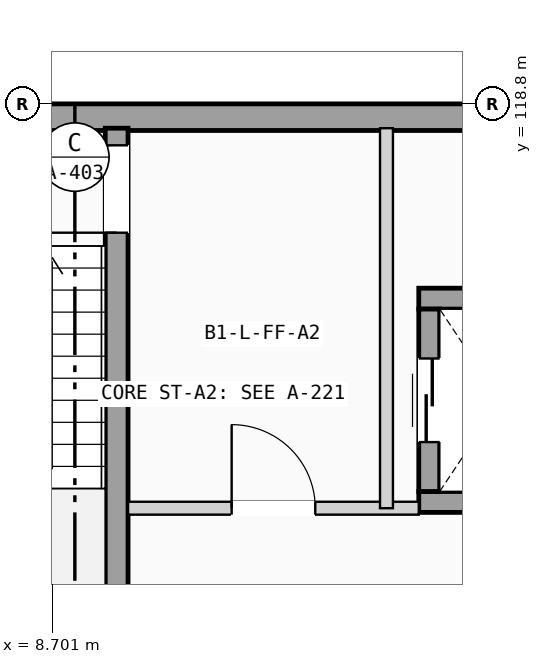
"""IFC4 building model, lengths in metres.
Left out: names, types, materials, properties, quantities, classifications, styles, units other than length and angle.
Written with IfcOpenShell. Run it as: python <this file> out.ifc"""

import sys

from ifc_helpers import new_model, si_unit, direction, frame, frame_2d, origin, place, context, subcontext, project, spatial, rectangle, extrude, element, fill, save


model = new_model("IFC4")
c1 = context("Model", 3, precision=1e-05, world=origin(), true_north=direction((0.0, 1.0)))
c2 = subcontext(c1, "Body", "Model", "MODEL_VIEW")
j1 = project(units=[si_unit("LENGTHUNIT", "METRE"), si_unit("PLANEANGLEUNIT", "RADIAN")], contexts=[c1])
p1 = place(None, origin())
s1 = spatial("IfcSite", under=j1, at=p1, CompositionType="ELEMENT")
p2 = place(p1, origin())
s2 = spatial("IfcBuilding", under=s1, at=p2, CompositionType="ELEMENT")
p3 = place(p2, frame((0.0, 0.0, -4.2)))
s3 = spatial("IfcBuildingStorey", under=s2, at=p3, CompositionType="ELEMENT", Elevation=-4.2)
p4 = place(p3, frame((0.0, 118.625, 0.0), z_axis=(0.0, 0.0, 1.0), x_axis=(1.0, 0.0, 0.0)))
e1 = element("IfcWall", 1, at=p4, inside=s3, PredefinedType="SOLIDWALL", context=c2, shape_type="SweptSolid", body=[
    extrude(rectangle(XDim=172.8, YDim=0.35, at=frame_2d((86.4, 0.0))), origin(), (0.0, 0.0, 1.0), 3.92),
])
p5 = place(p3, frame((9.55, 111.48, 0.0), z_axis=(0.0, 0.0, 1.0), x_axis=(0.0, 1.0, 0.0)))
e2 = element("IfcWall", 2, at=p5, inside=s3, PredefinedType="SHEAR", context=c2, shape_type="SweptSolid", body=[
    extrude(rectangle(XDim=7.0, YDim=0.3, at=frame_2d((3.5, 0.0))), origin(), (0.0, 0.0, 1.0), 3.92),
])
p6 = place(p5, frame((5.625, 0.0, 0.0)))
e3 = element("IfcOpeningElement", 3, at=p6, cuts=e2, PredefinedType="OPENING", context=c2, shape_type="SweptSolid", body=[
    extrude(rectangle(XDim=1.15, YDim=2.12, at=frame_2d((0.575, 1.06))), frame((0.0, 0.16, 0.0), z_axis=(0.0, -1.0, 0.0), x_axis=(1.0, 0.0, 0.0)), (0.0, 0.0, 1.0), 0.32),
])
for number, where, z_axis, x_axis in (
    (4, (13.525, 113.562, 0.0), (0.0, 0.0, 1.0), (1.0, 0.0, 0.0)),
    (5, (13.525, 116.238, 0.0), (0.0, 0.0, 1.0), (1.0, 0.0, 0.0)),
):
    element("IfcWall", number, at=place(p3, frame(where, z_axis=z_axis, x_axis=x_axis)), inside=s3, PredefinedType="SHEAR", context=c2, shape_type="SweptSolid", body=[
        extrude(rectangle(XDim=2.15, YDim=0.275, at=frame_2d((1.075, 0.0))), origin(), (0.0, 0.0, 1.0), 3.92),
    ])
p7 = place(p3, frame((13.663, 113.7, 0.0), z_axis=(0.0, 0.0, 1.0), x_axis=(0.0, 1.0, 0.0)))
e6 = element("IfcWall", 6, at=p7, inside=s3, PredefinedType="SHEAR", context=c2, shape_type="SweptSolid", body=[
    extrude(rectangle(XDim=2.4, YDim=0.275, at=frame_2d((1.2, 0.0))), origin(), (0.0, 0.0, 1.0), 3.92),
])
p8 = place(p7, frame((0.65, 0.0, 0.0)))
e7 = element("IfcOpeningElement", 7, at=p8, cuts=e6, PredefinedType="OPENING", context=c2, shape_type="SweptSolid", body=[
    extrude(rectangle(XDim=1.1, YDim=2.15, at=frame_2d((0.55, 1.075))), frame((0.0, 0.147, 0.0), z_axis=(0.0, -1.0, 0.0), x_axis=(1.0, 0.0, 0.0)), (0.0, 0.0, 1.0), 0.295),
])
p9 = place(p3, frame((9.7, 113.48, 0.0), z_axis=(0.0, 0.0, 1.0), x_axis=(1.0, 0.0, 0.0)))
e8 = element("IfcWall", 8, at=p9, inside=s3, PredefinedType="PARTITIONING", context=c2, shape_type="SweptSolid", body=[
    extrude(rectangle(XDim=3.825, YDim=0.17, at=frame_2d((1.913, 0.0))), origin(), (0.0, 0.0, 1.0), 3.84),
])
p10 = place(p9, frame((1.363, 0.0, 0.0)))
e9 = element("IfcOpeningElement", 9, at=p10, cuts=e8, PredefinedType="OPENING", context=c2, shape_type="SweptSolid", body=[
    extrude(rectangle(XDim=1.1, YDim=2.12, at=frame_2d((0.55, 1.06))), frame((0.0, 0.095, 0.0), z_axis=(0.0, -1.0, 0.0), x_axis=(1.0, 0.0, 0.0)), (0.0, 0.0, 1.0), 0.19),
])
p11 = place(p3, frame((13.1, 113.48, 0.0), z_axis=(0.0, 0.0, 1.0), x_axis=(0.0, 1.0, 0.0)))
e10 = element("IfcWall", 10, at=p11, inside=s3, PredefinedType="PARTITIONING", context=c2, shape_type="SweptSolid", body=[
    extrude(rectangle(XDim=5.0, YDim=0.17, at=frame_2d((2.5, 0.0))), origin(), (0.0, 0.0, 1.0), 3.84),
])
p12 = place(p6, origin())
e11 = element("IfcDoor", 11, at=p12, inside=s3, OperationType="SINGLE_SWING_LEFT", PredefinedType="DOOR", context=c2, shape_type="SweptSolid", body=[
    extrude(rectangle(XDim=1.15, YDim=2.12, at=frame_2d((0.575, 1.06))), frame((0.0, 0.025, 0.0), z_axis=(0.0, -1.0, 0.0), x_axis=(1.0, 0.0, 0.0)), (0.0, 0.0, 1.0), 0.05),
])
fill(e3, e11)
p13 = place(p8, origin())
e12 = element("IfcDoor", 12, at=p13, inside=s3, OperationType="SLIDING_TO_LEFT", PredefinedType="DOOR", context=c2, shape_type="SweptSolid", body=[
    extrude(rectangle(XDim=1.1, YDim=2.15, at=frame_2d((0.55, 1.075))), frame((0.0, 0.025, 0.0), z_axis=(0.0, -1.0, 0.0), x_axis=(1.0, 0.0, 0.0)), (0.0, 0.0, 1.0), 0.05),
])
fill(e7, e12)
p14 = place(p10, origin())
e13 = element("IfcDoor", 13, at=p14, inside=s3, OperationType="SINGLE_SWING_LEFT", PredefinedType="DOOR", context=c2, shape_type="SweptSolid", body=[
    extrude(rectangle(XDim=1.1, YDim=2.12, at=frame_2d((0.55, 1.06))), frame((0.0, 0.025, 0.0), z_axis=(0.0, -1.0, 0.0), x_axis=(1.0, 0.0, 0.0)), (0.0, 0.0, 1.0), 0.05),
])
fill(e9, e13)
save(model, sys.argv[1])
